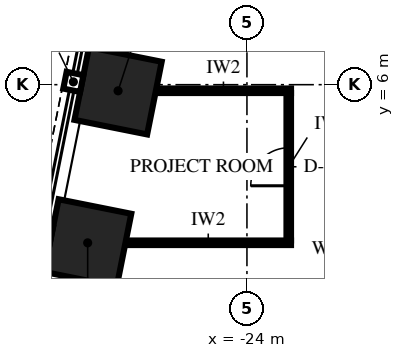
"""IFC4 building model, lengths in metres.
Left out: names, types, materials, properties, quantities, classifications, styles, units other than length and angle.
Written with IfcOpenShell. Run it as: python <this file> out.ifc"""

import sys

from ifc_helpers import new_model, si_unit, direction, frame, frame_2d, origin, origin_2d, place, context, subcontext, project, spatial, rectangle, extrude, element, fill, save


model = new_model("IFC4")
c1 = context("Model", 3, precision=1e-05, world=origin(), true_north=direction((0.0, 1.0)))
c2 = subcontext(c1, "Body", "Model", "MODEL_VIEW")
j1 = project(units=[si_unit("LENGTHUNIT", "METRE"), si_unit("PLANEANGLEUNIT", "RADIAN")], contexts=[c1])
p1 = place(None, origin())
s1 = spatial("IfcSite", under=j1, at=p1, CompositionType="ELEMENT")
p2 = place(p1, origin())
s2 = spatial("IfcBuilding", under=s1, at=p2, CompositionType="ELEMENT")
p3 = place(p2, frame((0.0, 0.0, 72.0)))
s3 = spatial("IfcBuildingStorey", under=s2, at=p3, CompositionType="ELEMENT", Elevation=72.0)
for number, where, z_axis, x_axis in (
    (1, (-27.391, 5.838, 0.0), (0.0, 0.0, 1.0), (-0.196, -0.981, 0.0)),
    (2, (-28.191, 1.838, 0.0), (0.0, 0.0, 1.0), (-0.196, -0.981, 0.0)),
):
    element("IfcColumn", number, at=place(p3, frame(where, z_axis=z_axis, x_axis=x_axis)), inside=s3, PredefinedType="COLUMN", context=c2, shape_type="SweptSolid", body=[
        extrude(rectangle(XDim=1.95, YDim=1.95, at=origin_2d()), origin(), (0.0, 0.0, 1.0), 4.0),
    ])
p4 = place(p3, frame((-27.196, 1.84, 0.0), z_axis=(0.0, 0.0, 1.0), x_axis=(1.0, 0.0, 0.0)))
e3 = element("IfcWall", 3, at=p4, inside=s3, PredefinedType="PARTITIONING", context=c2, shape_type="SweptSolid", body=[
    extrude(rectangle(XDim=4.356, YDim=0.12, at=frame_2d((2.178, 0.0))), origin(), (0.0, 0.0, 1.0), 3.25),
])
p5 = place(p3, frame((-26.396, 5.84, 0.0), z_axis=(0.0, 0.0, 1.0), x_axis=(1.0, 0.0, 0.0)))
e4 = element("IfcWall", 4, at=p5, inside=s3, PredefinedType="PARTITIONING", context=c2, shape_type="SweptSolid", body=[
    extrude(rectangle(XDim=3.556, YDim=0.12, at=frame_2d((1.778, 0.0))), origin(), (0.0, 0.0, 1.0), 2.842),
])
p6 = place(p3, frame((-22.9, 1.9, 0.0), z_axis=(0.0, 0.0, 1.0), x_axis=(0.0, 1.0, 0.0)))
e5 = element("IfcWall", 5, at=p6, inside=s3, PredefinedType="PARTITIONING", context=c2, shape_type="SweptSolid", body=[
    extrude(rectangle(XDim=3.88, YDim=0.12, at=frame_2d((1.94, 0.0))), origin(), (0.0, 0.0, 1.0), 3.85),
])
p7 = place(p6, frame((1.44, 0.0, 0.0)))
e6 = element("IfcOpeningElement", 6, at=p7, cuts=e5, PredefinedType="OPENING", context=c2, shape_type="SweptSolid", body=[
    extrude(rectangle(XDim=1.0, YDim=2.4, at=frame_2d((0.5, 1.2))), frame((0.0, 0.075, 0.0), z_axis=(0.0, -1.0, 0.0), x_axis=(1.0, 0.0, 0.0)), (0.0, 0.0, 1.0), 0.15),
])
p8 = place(p7, origin())
e7 = element("IfcDoor", 7, at=p8, inside=s3, OperationType="SINGLE_SWING_RIGHT", PredefinedType="DOOR", context=c2, shape_type="SweptSolid", body=[
    extrude(rectangle(XDim=1.0, YDim=2.4, at=frame_2d((0.5, 1.2))), frame((0.0, 0.06, 0.0), z_axis=(0.0, -1.0, 0.0), x_axis=(1.0, 0.0, 0.0)), (0.0, 0.0, 1.0), 0.12),
])
fill(e6, e7)
save(model, sys.argv[1])
